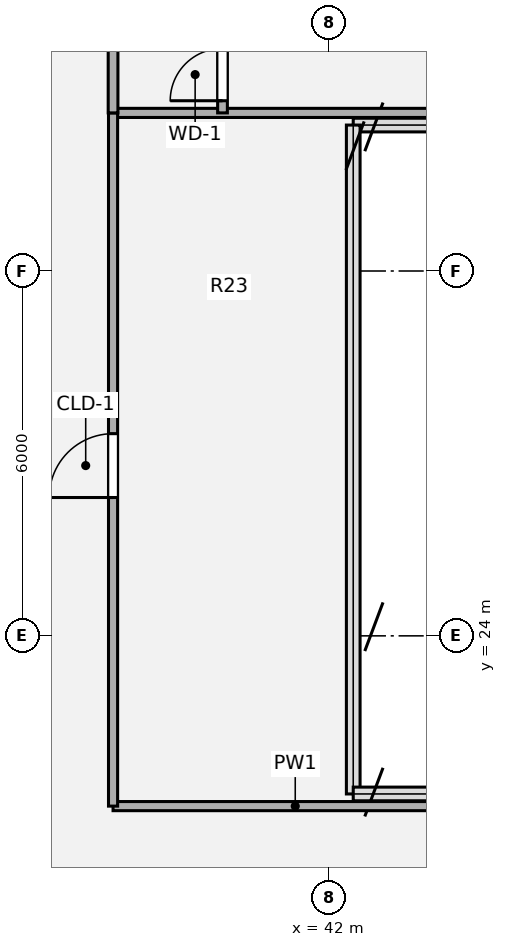
"""IFC4 building model, lengths in metres.
Left out: names, types, materials, properties, quantities, classifications, styles, units other than length and angle.
Written with IfcOpenShell. Run it as: python <this file> out.ifc"""

import sys

from ifc_helpers import new_model, si_unit, direction, frame, frame_2d, origin, origin_2d, place, context, subcontext, project, spatial, rectangle, extrude, source, transform, mapped, element, fill, save


model = new_model("IFC4")
c1 = context("Model", 3, precision=1e-05, world=origin(), true_north=direction((0.0, 1.0)))
c2 = subcontext(c1, "Body", "Model", "MODEL_VIEW")
j1 = project(units=[si_unit("LENGTHUNIT", "METRE"), si_unit("PLANEANGLEUNIT", "RADIAN")], contexts=[c1])
p1 = place(None, origin())
s1 = spatial("IfcSite", under=j1, at=p1, CompositionType="ELEMENT")
p2 = place(p1, origin())
s2 = spatial("IfcBuilding", under=s1, at=p2, CompositionType="ELEMENT")
p3 = place(p2, frame((0.0, 0.0, 209.34)))
s3 = spatial("IfcBuildingStorey", under=s2, at=p3, CompositionType="ELEMENT", Elevation=209.34)
p4 = place(p3, frame((38.45, 21.2, 0.0), z_axis=(0.0, 0.0, 1.0), x_axis=(1.0, 0.0, 0.0)))
e1 = element("IfcWall", 1, at=p4, inside=s3, PredefinedType="PARTITIONING", context=c2, shape_type="SweptSolid", body=[
    extrude(rectangle(XDim=5.993, YDim=0.15, at=frame_2d((2.996, 0.0))), origin(), (0.0, 0.0, 1.0), 3.342),
])
p5 = place(p3, frame((38.45, 32.6, 0.0), z_axis=(0.0, 0.0, 1.0), x_axis=(1.0, 0.0, 0.0)))
e2 = element("IfcWall", 2, at=p5, inside=s3, PredefinedType="PARTITIONING", context=c2, shape_type="SweptSolid", body=[
    extrude(rectangle(XDim=5.993, YDim=0.15, at=frame_2d((2.997, 0.0))), origin(), (0.0, 0.0, 1.0), 3.342),
])
p6 = place(p3, frame((38.45, 21.2, 0.0), z_axis=(0.0, 0.0, 1.0), x_axis=(0.0, 1.0, 0.0)))
e3 = element("IfcWall", 3, at=p6, inside=s3, PredefinedType="PARTITIONING", context=c2, shape_type="SweptSolid", body=[
    extrude(rectangle(XDim=11.4, YDim=0.15, at=frame_2d((5.7, 0.0))), origin(), (0.0, 0.0, 1.0), 3.342),
])
p7 = place(p6, frame((5.075, 0.0, 0.0)))
e4 = element("IfcOpeningElement", 4, at=p7, cuts=e3, PredefinedType="OPENING", context=c2, shape_type="SweptSolid", body=[
    extrude(rectangle(XDim=1.05, YDim=2.1, at=origin_2d()), frame((0.525, 0.085, 1.05), z_axis=(0.0, -1.0, 0.0), x_axis=(1.0, 0.0, 0.0)), (0.0, 0.0, 1.0), 0.17),
])
p8 = place(p3, frame((38.45, 32.6, 0.0), z_axis=(0.0, 0.0, 1.0), x_axis=(0.0, 1.0, 0.0)))
e5 = element("IfcWall", 5, at=p8, inside=s3, PredefinedType="PLUMBINGWALL", context=c2, shape_type="SweptSolid", body=[
    extrude(rectangle(XDim=2.4, YDim=0.16, at=frame_2d((1.2, 0.0))), origin(), (0.0, 0.0, 1.0), 3.342),
])
p9 = place(p3, frame((40.25, 32.6, 0.0), z_axis=(0.0, 0.0, 1.0), x_axis=(0.0, 1.0, 0.0)))
e6 = element("IfcWall", 6, at=p9, inside=s3, PredefinedType="PLUMBINGWALL", context=c2, shape_type="SweptSolid", body=[
    extrude(rectangle(XDim=2.4, YDim=0.16, at=frame_2d((1.2, 0.0))), origin(), (0.0, 0.0, 1.0), 3.342),
])
p10 = place(p9, frame((0.2, 0.0, 0.0)))
e7 = element("IfcOpeningElement", 7, at=p10, cuts=e6, PredefinedType="OPENING", context=c2, shape_type="SweptSolid", body=[
    extrude(rectangle(XDim=0.86, YDim=2.1, at=origin_2d()), frame((0.43, 0.09, 1.05), z_axis=(0.0, -1.0, 0.0), x_axis=(1.0, 0.0, 0.0)), (0.0, 0.0, 1.0), 0.18),
])
m1 = source(origin(), c2, "Body", "SweptSolid", [
    extrude(rectangle(XDim=1.05, YDim=2.1, at=origin_2d()), frame((0.525, 0.025, 1.05), z_axis=(0.0, -1.0, 0.0), x_axis=(1.0, 0.0, 0.0)), (0.0, 0.0, 1.0), 0.05),
])
p11 = place(p7, origin())
e8 = element("IfcDoor", 8, at=p11, inside=s3, OperationType="SINGLE_SWING_LEFT", PredefinedType="DOOR", context=c2, shape_type="MappedRepresentation", body=[
    mapped(m1, transform((0.0, 0.0, 0.0), x_axis=(1.0, 0.0, 0.0), y_axis=(0.0, 1.0, 0.0), z_axis=(0.0, 0.0, 1.0), scale=1.0)),
])
fill(e4, e8)
m2 = source(origin(), c2, "Body", "SweptSolid", [
    extrude(rectangle(XDim=0.86, YDim=2.1, at=origin_2d()), frame((0.43, 0.025, 1.05), z_axis=(0.0, -1.0, 0.0), x_axis=(1.0, 0.0, 0.0)), (0.0, 0.0, 1.0), 0.05),
])
p12 = place(p10, origin())
e9 = element("IfcDoor", 9, at=p12, inside=s3, OperationType="SINGLE_SWING_LEFT", PredefinedType="DOOR", context=c2, shape_type="MappedRepresentation", body=[
    mapped(m2, transform((0.0, 0.0, 0.0), x_axis=(1.0, 0.0, 0.0), y_axis=(0.0, 1.0, 0.0), z_axis=(0.0, 0.0, 1.0), scale=1.0)),
])
fill(e7, e9)
save(model, sys.argv[1])
